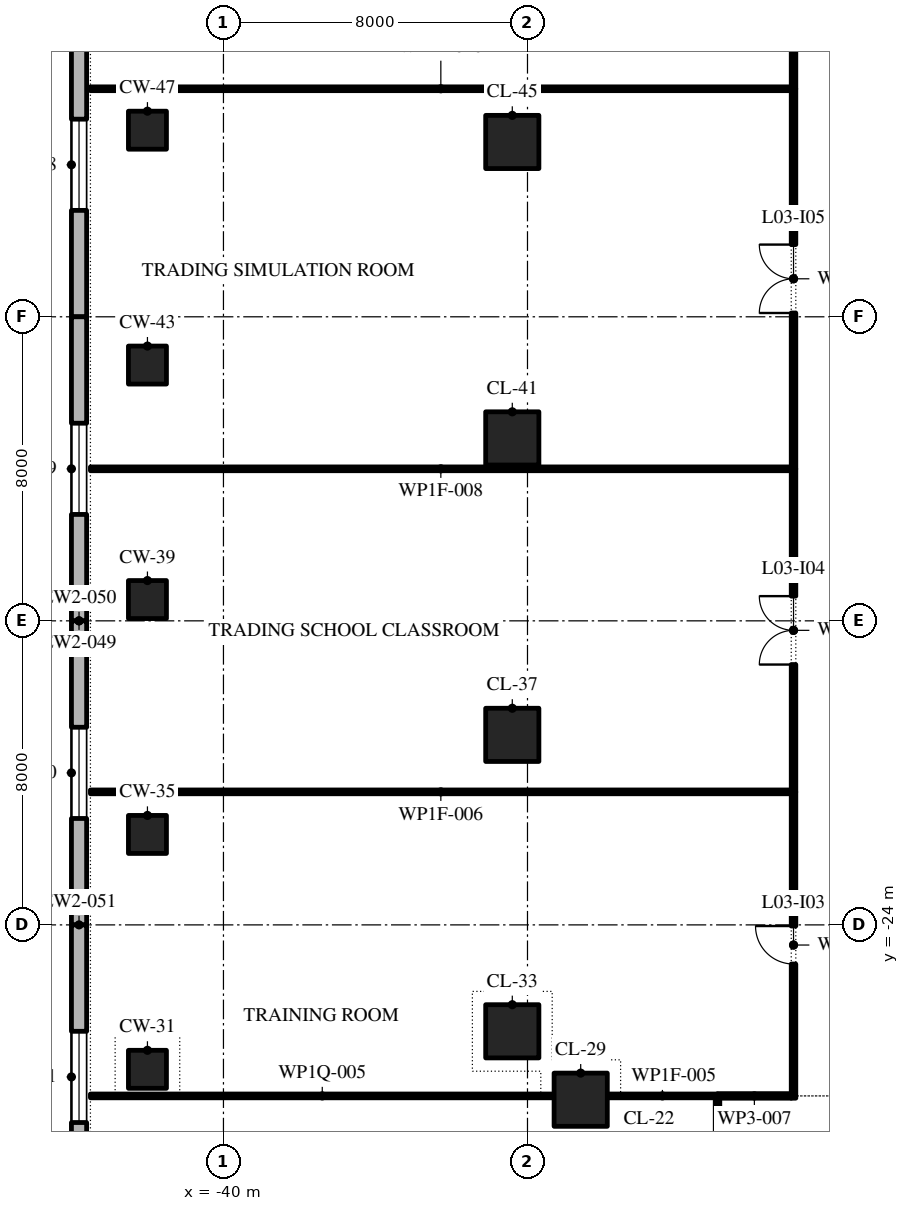
"""IFC4 building model, lengths in metres.
Left out: names, types, materials, properties, quantities, classifications, styles, units other than length and angle.
Written with IfcOpenShell. Run it as: python <this file> out.ifc"""

import sys

from ifc_helpers import new_model, si_unit, direction, frame, frame_2d, origin, origin_2d, place, context, subcontext, project, spatial, polyline, rectangle, outline, extrude, element, fill, save


model = new_model("IFC4")
c1 = context("Model", 3, precision=1e-05, world=origin(), true_north=direction((0.0, 1.0)))
c2 = subcontext(c1, "Body", "Model", "MODEL_VIEW")
j1 = project(units=[si_unit("LENGTHUNIT", "METRE"), si_unit("PLANEANGLEUNIT", "RADIAN")], contexts=[c1])
p1 = place(None, origin())
s1 = spatial("IfcSite", under=j1, at=p1, CompositionType="ELEMENT")
p2 = place(p1, origin())
s2 = spatial("IfcBuilding", under=s1, at=p2, CompositionType="ELEMENT")
p3 = place(p2, frame((0.0, 0.0, 19.2)))
s3 = spatial("IfcBuildingStorey", under=s2, at=p3, CompositionType="ELEMENT", Elevation=19.2)
p4 = place(p3, frame((-30.6, -28.6, 0.0), z_axis=(0.0, 0.0, 1.0), x_axis=(1.0, 0.0, 0.0)))
e1 = element("IfcColumn", 1, at=p4, inside=s3, PredefinedType="COLUMN", context=c2, shape_type="SweptSolid", body=[
    extrude(rectangle(XDim=1.4, YDim=1.4, at=origin_2d()), origin(), (0.0, 0.0, 1.0), 4.8),
])
p5 = place(p3, frame((-42.0, -27.8, 0.0), z_axis=(0.0, 0.0, 1.0), x_axis=(1.0, 0.0, 0.0)))
e2 = element("IfcColumn", 2, at=p5, inside=s3, PredefinedType="COLUMN", context=c2, shape_type="SweptSolid", body=[
    extrude(rectangle(XDim=1.0, YDim=1.0, at=origin_2d()), origin(), (0.0, 0.0, 1.0), 4.8),
])
p6 = place(p3, frame((-32.4, -26.8, 0.0), z_axis=(0.0, 0.0, 1.0), x_axis=(1.0, 0.0, 0.0)))
e3 = element("IfcColumn", 3, at=p6, inside=s3, PredefinedType="COLUMN", context=c2, shape_type="SweptSolid", body=[
    extrude(rectangle(XDim=1.4, YDim=1.4, at=origin_2d()), origin(), (0.0, 0.0, 1.0), 4.8),
])
p7 = place(p3, frame((-42.0, -21.62, 0.0), z_axis=(0.0, 0.0, 1.0), x_axis=(1.0, 0.0, 0.0)))
e4 = element("IfcColumn", 4, at=p7, inside=s3, PredefinedType="COLUMN", context=c2, shape_type="SweptSolid", body=[
    extrude(rectangle(XDim=1.0, YDim=1.0, at=origin_2d()), origin(), (0.0, 0.0, 1.0), 4.8),
])
p8 = place(p3, frame((-32.4, -19.0, 0.0), z_axis=(0.0, 0.0, 1.0), x_axis=(1.0, 0.0, 0.0)))
e5 = element("IfcColumn", 5, at=p8, inside=s3, PredefinedType="COLUMN", context=c2, shape_type="SweptSolid", body=[
    extrude(rectangle(XDim=1.4, YDim=1.4, at=origin_2d()), origin(), (0.0, 0.0, 1.0), 4.8),
])
p9 = place(p3, frame((-42.0, -15.44, 0.0), z_axis=(0.0, 0.0, 1.0), x_axis=(1.0, 0.0, 0.0)))
e6 = element("IfcColumn", 6, at=p9, inside=s3, PredefinedType="COLUMN", context=c2, shape_type="SweptSolid", body=[
    extrude(rectangle(XDim=1.0, YDim=1.0, at=origin_2d()), origin(), (0.0, 0.0, 1.0), 4.8),
])
p10 = place(p3, frame((-32.4, -11.2, 0.0), z_axis=(0.0, 0.0, 1.0), x_axis=(1.0, 0.0, 0.0)))
e7 = element("IfcColumn", 7, at=p10, inside=s3, PredefinedType="COLUMN", context=c2, shape_type="SweptSolid", body=[
    extrude(rectangle(XDim=1.4, YDim=1.4, at=origin_2d()), origin(), (0.0, 0.0, 1.0), 4.8),
])
p11 = place(p3, frame((-42.0, -9.27, 0.0), z_axis=(0.0, 0.0, 1.0), x_axis=(1.0, 0.0, 0.0)))
e8 = element("IfcColumn", 8, at=p11, inside=s3, PredefinedType="COLUMN", context=c2, shape_type="SweptSolid", body=[
    extrude(rectangle(XDim=1.0, YDim=1.0, at=origin_2d()), origin(), (0.0, 0.0, 1.0), 4.8),
])
p12 = place(p3, frame((-32.4, -3.4, 0.0), z_axis=(0.0, 0.0, 1.0), x_axis=(1.0, 0.0, 0.0)))
e9 = element("IfcColumn", 9, at=p12, inside=s3, PredefinedType="COLUMN", context=c2, shape_type="SweptSolid", body=[
    extrude(rectangle(XDim=1.4, YDim=1.4, at=origin_2d()), origin(), (0.0, 0.0, 1.0), 4.8),
])
p13 = place(p3, frame((-42.0, -3.09, 0.0), z_axis=(0.0, 0.0, 1.0), x_axis=(1.0, 0.0, 0.0)))
e10 = element("IfcColumn", 10, at=p13, inside=s3, PredefinedType="COLUMN", context=c2, shape_type="SweptSolid", body=[
    extrude(rectangle(XDim=1.0, YDim=1.0, at=origin_2d()), origin(), (0.0, 0.0, 1.0), 4.8),
])
p14 = place(p3, frame((-43.8, 0.0, 0.0), z_axis=(0.0, 0.0, 1.0), x_axis=(0.0, -1.0, 0.0)))
e11 = element("IfcWall", 11, at=p14, inside=s3, PredefinedType="STANDARD", context=c2, shape_type="SweptSolid", body=[
    extrude(rectangle(XDim=8.0, YDim=0.4, at=frame_2d((4.0, 0.0))), origin(), (0.0, 0.0, 1.0), 4.5),
])
p15 = place(p14, frame((2.8, 0.0, 0.9)))
e12 = element("IfcOpeningElement", 12, at=p15, cuts=e11, PredefinedType="OPENING", context=c2, shape_type="SweptSolid", body=[
    extrude(outline(polyline([(0.0, 0.0), (2.4, 0.0), (2.4, 1.5), (2.378, 1.758), (2.313, 2.009), (2.207, 2.245), (2.063, 2.46), (1.885, 2.648), (1.677, 2.804), (1.447, 2.922), (1.2, 3.0), (0.953, 2.922), (0.722, 2.804), (0.515, 2.648), (0.337, 2.46), (0.193, 2.245), (0.087, 2.009), (0.022, 1.758), (0.0, 1.5), (0.0, 0.0)])), frame((0.0, 0.21, 0.0), z_axis=(0.0, -1.0, 0.0), x_axis=(1.0, 0.0, 0.0)), (0.0, 0.0, 1.0), 0.42),
])
p16 = place(p3, frame((-43.8, -8.0, 0.0), z_axis=(0.0, 0.0, 1.0), x_axis=(0.0, -1.0, 0.0)))
e13 = element("IfcWall", 13, at=p16, inside=s3, PredefinedType="STANDARD", context=c2, shape_type="SweptSolid", body=[
    extrude(rectangle(XDim=8.0, YDim=0.4, at=frame_2d((4.0, 0.0))), origin(), (0.0, 0.0, 1.0), 4.5),
])
p17 = place(p16, frame((2.8, 0.0, 0.9)))
e14 = element("IfcOpeningElement", 14, at=p17, cuts=e13, PredefinedType="OPENING", context=c2, shape_type="SweptSolid", body=[
    extrude(outline(polyline([(0.0, 0.0), (2.4, 0.0), (2.4, 1.5), (2.378, 1.758), (2.313, 2.009), (2.207, 2.245), (2.063, 2.46), (1.885, 2.648), (1.677, 2.804), (1.447, 2.922), (1.2, 3.0), (0.953, 2.922), (0.722, 2.804), (0.515, 2.648), (0.337, 2.46), (0.193, 2.245), (0.087, 2.009), (0.022, 1.758), (0.0, 1.5), (0.0, 0.0)])), frame((0.0, 0.21, 0.0), z_axis=(0.0, -1.0, 0.0), x_axis=(1.0, 0.0, 0.0)), (0.0, 0.0, 1.0), 0.42),
])
p18 = place(p3, frame((-43.8, -16.0, 0.0), z_axis=(0.0, 0.0, 1.0), x_axis=(0.0, -1.0, 0.0)))
e15 = element("IfcWall", 15, at=p18, inside=s3, PredefinedType="STANDARD", context=c2, shape_type="SweptSolid", body=[
    extrude(rectangle(XDim=8.0, YDim=0.4, at=frame_2d((4.0, 0.0))), origin(), (0.0, 0.0, 1.0), 4.5),
])
p19 = place(p18, frame((2.8, 0.0, 0.9)))
e16 = element("IfcOpeningElement", 16, at=p19, cuts=e15, PredefinedType="OPENING", context=c2, shape_type="SweptSolid", body=[
    extrude(outline(polyline([(0.0, 0.0), (2.4, 0.0), (2.4, 1.5), (2.378, 1.758), (2.313, 2.009), (2.207, 2.245), (2.063, 2.46), (1.885, 2.648), (1.677, 2.804), (1.447, 2.922), (1.2, 3.0), (0.953, 2.922), (0.722, 2.804), (0.515, 2.648), (0.337, 2.46), (0.193, 2.245), (0.087, 2.009), (0.022, 1.758), (0.0, 1.5), (0.0, 0.0)])), frame((0.0, 0.21, 0.0), z_axis=(0.0, -1.0, 0.0), x_axis=(1.0, 0.0, 0.0)), (0.0, 0.0, 1.0), 0.42),
])
p20 = place(p3, frame((-43.8, -24.0, 0.0), z_axis=(0.0, 0.0, 1.0), x_axis=(0.0, -1.0, 0.0)))
e17 = element("IfcWall", 17, at=p20, inside=s3, PredefinedType="STANDARD", context=c2, shape_type="SweptSolid", body=[
    extrude(rectangle(XDim=8.0, YDim=0.4, at=frame_2d((4.0, 0.0))), origin(), (0.0, 0.0, 1.0), 4.5),
])
p21 = place(p20, frame((2.8, 0.0, 0.9)))
e18 = element("IfcOpeningElement", 18, at=p21, cuts=e17, PredefinedType="OPENING", context=c2, shape_type="SweptSolid", body=[
    extrude(outline(polyline([(0.0, 0.0), (2.4, 0.0), (2.4, 1.5), (2.378, 1.758), (2.313, 2.009), (2.207, 2.245), (2.063, 2.46), (1.885, 2.648), (1.677, 2.804), (1.447, 2.922), (1.2, 3.0), (0.953, 2.922), (0.722, 2.804), (0.515, 2.648), (0.337, 2.46), (0.193, 2.245), (0.087, 2.009), (0.022, 1.758), (0.0, 1.5), (0.0, 0.0)])), frame((0.0, 0.21, 0.0), z_axis=(0.0, -1.0, 0.0), x_axis=(1.0, 0.0, 0.0)), (0.0, 0.0, 1.0), 0.42),
])
p22 = place(p3, frame((-43.5, -28.5, 0.0), z_axis=(0.0, 0.0, 1.0), x_axis=(1.0, 0.0, 0.0)))
e19 = element("IfcWall", 19, at=p22, inside=s3, PredefinedType="PARTITIONING", context=c2, shape_type="SweptSolid", body=[
    extrude(rectangle(XDim=12.2, YDim=0.1, at=frame_2d((6.1, 0.0))), origin(), (0.0, 0.0, 1.0), 3.964),
])
p23 = place(p3, frame((-29.9, -28.5, 0.0), z_axis=(0.0, 0.0, 1.0), x_axis=(1.0, 0.0, 0.0)))
e20 = element("IfcWall", 20, at=p23, inside=s3, PredefinedType="PARTITIONING", context=c2, shape_type="SweptSolid", body=[
    extrude(rectangle(XDim=2.9, YDim=0.1, at=frame_2d((1.45, 0.0))), origin(), (0.0, 0.0, 1.0), 4.5),
])
p24 = place(p3, frame((-27.0, -28.5, 0.0), z_axis=(0.0, 0.0, 1.0), x_axis=(1.0, 0.0, 0.0)))
e21 = element("IfcWall", 21, at=p24, inside=s3, PredefinedType="PARTITIONING", context=c2, shape_type="SweptSolid", body=[
    extrude(rectangle(XDim=1.94, YDim=0.12, at=frame_2d((0.97, 0.0))), origin(), (0.0, 0.0, 1.0), 4.5),
])
for number, where, z_axis, x_axis in (
    (22, (-43.5, -20.5, 0.0), (0.0, 0.0, 1.0), (1.0, 0.0, 0.0)),
    (23, (-43.5, -12.0, 0.0), (0.0, 0.0, 1.0), (1.0, 0.0, 0.0)),
    (24, (-43.5, -2.0, 0.0), (0.0, 0.0, 1.0), (1.0, 0.0, 0.0)),
):
    element("IfcWall", number, at=place(p3, frame(where, z_axis=z_axis, x_axis=x_axis)), inside=s3, PredefinedType="PARTITIONING", context=c2, shape_type="SweptSolid", body=[
        extrude(rectangle(XDim=18.44, YDim=0.1, at=frame_2d((9.22, 0.0))), origin(), (0.0, 0.0, 1.0), 4.5),
    ])
p25 = place(p3, frame((-27.0, -32.0, 0.0), z_axis=(0.0, 0.0, 1.0), x_axis=(0.0, 1.0, 0.0)))
e25 = element("IfcWall", 25, at=p25, inside=s3, PredefinedType="PARTITIONING", context=c2, shape_type="SweptSolid", body=[
    extrude(rectangle(XDim=3.44, YDim=0.12, at=frame_2d((1.72, 0.0))), origin(), (0.0, 0.0, 1.0), 4.5),
])
p26 = place(p3, frame((-25.0, -28.56, 0.0), z_axis=(0.0, 0.0, 1.0), x_axis=(0.0, 1.0, 0.0)))
e26 = element("IfcWall", 26, at=p26, inside=s3, PredefinedType="PARTITIONING", context=c2, shape_type="SweptSolid", body=[
    extrude(rectangle(XDim=8.06, YDim=0.12, at=frame_2d((4.03, 0.0))), origin(), (0.0, 0.0, 1.0), 4.5),
])
p27 = place(p26, frame((3.53, 0.0, 0.0)))
e27 = element("IfcOpeningElement", 27, at=p27, cuts=e26, PredefinedType="OPENING", context=c2, shape_type="SweptSolid", body=[
    extrude(rectangle(XDim=1.0, YDim=2.1, at=frame_2d((0.5, 1.05))), frame((0.0, 0.07, 0.0), z_axis=(0.0, -1.0, 0.0), x_axis=(1.0, 0.0, 0.0)), (0.0, 0.0, 1.0), 0.14),
])
p28 = place(p3, frame((-25.0, -20.5, 0.0), z_axis=(0.0, 0.0, 1.0), x_axis=(0.0, 1.0, 0.0)))
e28 = element("IfcWall", 28, at=p28, inside=s3, PredefinedType="PARTITIONING", context=c2, shape_type="SweptSolid", body=[
    extrude(rectangle(XDim=8.5, YDim=0.12, at=frame_2d((4.25, 0.0))), origin(), (0.0, 0.0, 1.0), 4.5),
])
p29 = place(p28, frame((3.35, 0.0, 0.0)))
e29 = element("IfcOpeningElement", 29, at=p29, cuts=e28, PredefinedType="OPENING", context=c2, shape_type="SweptSolid", body=[
    extrude(rectangle(XDim=1.8, YDim=2.1, at=frame_2d((0.9, 1.05))), frame((0.0, 0.07, 0.0), z_axis=(0.0, -1.0, 0.0), x_axis=(1.0, 0.0, 0.0)), (0.0, 0.0, 1.0), 0.14),
])
p30 = place(p3, frame((-25.0, -12.0, 0.0), z_axis=(0.0, 0.0, 1.0), x_axis=(0.0, 1.0, 0.0)))
e30 = element("IfcWall", 30, at=p30, inside=s3, PredefinedType="PARTITIONING", context=c2, shape_type="SweptSolid", body=[
    extrude(rectangle(XDim=10.0, YDim=0.12, at=frame_2d((5.0, 0.0))), origin(), (0.0, 0.0, 1.0), 4.5),
])
p31 = place(p30, frame((4.1, 0.0, 0.0)))
e31 = element("IfcOpeningElement", 31, at=p31, cuts=e30, PredefinedType="OPENING", context=c2, shape_type="SweptSolid", body=[
    extrude(rectangle(XDim=1.8, YDim=2.1, at=frame_2d((0.9, 1.05))), frame((0.0, 0.07, 0.0), z_axis=(0.0, -1.0, 0.0), x_axis=(1.0, 0.0, 0.0)), (0.0, 0.0, 1.0), 0.14),
])
p32 = place(p3, frame((-25.0, -2.0, 0.0), z_axis=(0.0, 0.0, 1.0), x_axis=(0.0, 1.0, 0.0)))
e32 = element("IfcWall", 32, at=p32, inside=s3, PredefinedType="PARTITIONING", context=c2, shape_type="SweptSolid", body=[
    extrude(rectangle(XDim=9.5, YDim=0.12, at=frame_2d((4.75, 0.0))), origin(), (0.0, 0.0, 1.0), 4.5),
])
p33 = place(p32, frame((3.85, 0.0, 0.0)))
e33 = element("IfcOpeningElement", 33, at=p33, cuts=e32, PredefinedType="OPENING", context=c2, shape_type="SweptSolid", body=[
    extrude(rectangle(XDim=1.8, YDim=2.1, at=frame_2d((0.9, 1.05))), frame((0.0, 0.07, 0.0), z_axis=(0.0, -1.0, 0.0), x_axis=(1.0, 0.0, 0.0)), (0.0, 0.0, 1.0), 0.14),
])
p34 = place(p15, origin())
e34 = element("IfcWindow", 34, at=p34, inside=s3, PartitioningType="DOUBLE_PANEL_VERTICAL", PredefinedType="WINDOW", context=c2, shape_type="SweptSolid", body=[
    extrude(outline(polyline([(0.0, 0.0), (2.4, 0.0), (2.4, 1.5), (2.378, 1.758), (2.313, 2.009), (2.207, 2.245), (2.063, 2.46), (1.885, 2.648), (1.677, 2.804), (1.447, 2.922), (1.2, 3.0), (0.953, 2.922), (0.722, 2.804), (0.515, 2.648), (0.337, 2.46), (0.193, 2.245), (0.087, 2.009), (0.022, 1.758), (0.0, 1.5), (0.0, 0.0)])), frame((0.0, 0.03, 0.0), z_axis=(0.0, -1.0, 0.0), x_axis=(1.0, 0.0, 0.0)), (0.0, 0.0, 1.0), 0.06),
])
fill(e12, e34)
p35 = place(p17, origin())
e35 = element("IfcWindow", 35, at=p35, inside=s3, PartitioningType="DOUBLE_PANEL_VERTICAL", PredefinedType="WINDOW", context=c2, shape_type="SweptSolid", body=[
    extrude(outline(polyline([(0.0, 0.0), (2.4, 0.0), (2.4, 1.5), (2.378, 1.758), (2.313, 2.009), (2.207, 2.245), (2.063, 2.46), (1.885, 2.648), (1.677, 2.804), (1.447, 2.922), (1.2, 3.0), (0.953, 2.922), (0.722, 2.804), (0.515, 2.648), (0.337, 2.46), (0.193, 2.245), (0.087, 2.009), (0.022, 1.758), (0.0, 1.5), (0.0, 0.0)])), frame((0.0, 0.03, 0.0), z_axis=(0.0, -1.0, 0.0), x_axis=(1.0, 0.0, 0.0)), (0.0, 0.0, 1.0), 0.06),
])
fill(e14, e35)
p36 = place(p19, origin())
e36 = element("IfcWindow", 36, at=p36, inside=s3, PartitioningType="DOUBLE_PANEL_VERTICAL", PredefinedType="WINDOW", context=c2, shape_type="SweptSolid", body=[
    extrude(outline(polyline([(0.0, 0.0), (2.4, 0.0), (2.4, 1.5), (2.378, 1.758), (2.313, 2.009), (2.207, 2.245), (2.063, 2.46), (1.885, 2.648), (1.677, 2.804), (1.447, 2.922), (1.2, 3.0), (0.953, 2.922), (0.722, 2.804), (0.515, 2.648), (0.337, 2.46), (0.193, 2.245), (0.087, 2.009), (0.022, 1.758), (0.0, 1.5), (0.0, 0.0)])), frame((0.0, 0.03, 0.0), z_axis=(0.0, -1.0, 0.0), x_axis=(1.0, 0.0, 0.0)), (0.0, 0.0, 1.0), 0.06),
])
fill(e16, e36)
p37 = place(p21, origin())
e37 = element("IfcWindow", 37, at=p37, inside=s3, PartitioningType="DOUBLE_PANEL_VERTICAL", PredefinedType="WINDOW", context=c2, shape_type="SweptSolid", body=[
    extrude(outline(polyline([(0.0, 0.0), (2.4, 0.0), (2.4, 1.5), (2.378, 1.758), (2.313, 2.009), (2.207, 2.245), (2.063, 2.46), (1.885, 2.648), (1.677, 2.804), (1.447, 2.922), (1.2, 3.0), (0.953, 2.922), (0.722, 2.804), (0.515, 2.648), (0.337, 2.46), (0.193, 2.245), (0.087, 2.009), (0.022, 1.758), (0.0, 1.5), (0.0, 0.0)])), frame((0.0, 0.03, 0.0), z_axis=(0.0, -1.0, 0.0), x_axis=(1.0, 0.0, 0.0)), (0.0, 0.0, 1.0), 0.06),
])
fill(e18, e37)
p38 = place(p27, origin())
e38 = element("IfcDoor", 38, at=p38, inside=s3, OperationType="SINGLE_SWING_LEFT", PredefinedType="DOOR", context=c2, shape_type="SweptSolid", body=[
    extrude(rectangle(XDim=1.0, YDim=2.1, at=frame_2d((0.5, 1.05))), frame((0.0, 0.025, 0.0), z_axis=(0.0, -1.0, 0.0), x_axis=(1.0, 0.0, 0.0)), (0.0, 0.0, 1.0), 0.05),
])
fill(e27, e38)
p39 = place(p29, origin())
e39 = element("IfcDoor", 39, at=p39, inside=s3, OperationType="SINGLE_SWING_RIGHT", PredefinedType="DOOR", context=c2, shape_type="SweptSolid", body=[
    extrude(rectangle(XDim=1.8, YDim=2.1, at=frame_2d((0.9, 1.05))), frame((0.0, 0.025, 0.0), z_axis=(0.0, -1.0, 0.0), x_axis=(1.0, 0.0, 0.0)), (0.0, 0.0, 1.0), 0.05),
])
fill(e29, e39)
p40 = place(p31, origin())
e40 = element("IfcDoor", 40, at=p40, inside=s3, OperationType="SINGLE_SWING_RIGHT", PredefinedType="DOOR", context=c2, shape_type="SweptSolid", body=[
    extrude(rectangle(XDim=1.8, YDim=2.1, at=frame_2d((0.9, 1.05))), frame((0.0, 0.025, 0.0), z_axis=(0.0, -1.0, 0.0), x_axis=(1.0, 0.0, 0.0)), (0.0, 0.0, 1.0), 0.05),
])
fill(e31, e40)
save(model, sys.argv[1])
